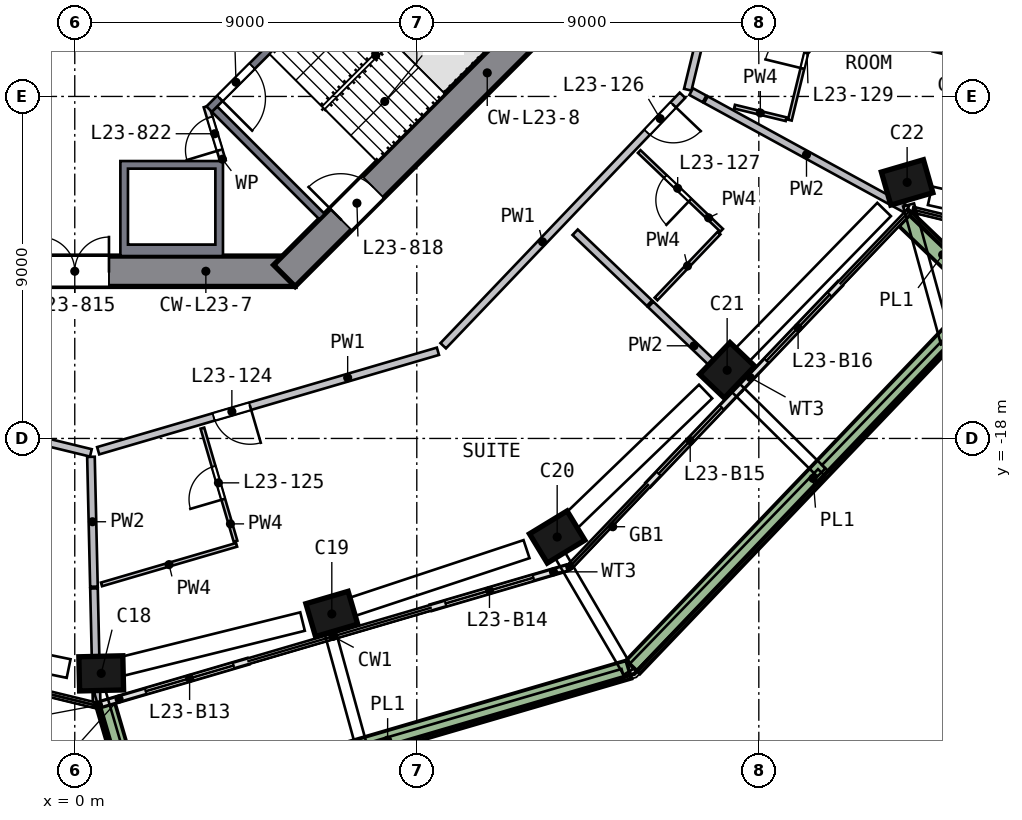
"""IFC4 building model, lengths in metres.
Left out: names, types, materials, properties, quantities, classifications, styles, units other than length and angle.
Written with IfcOpenShell. Run it as: python <this file> out.ifc"""

import sys

from ifc_helpers import new_model, si_unit, direction, frame, frame_2d, origin, origin_2d, place, context, subcontext, project, spatial, polyline, rectangle, outline, extrude, element, fill, save


model = new_model("IFC4")
c1 = context("Model", 3, precision=1e-05, world=origin(), true_north=direction((0.0, 1.0)))
c2 = subcontext(c1, "Body", "Model", "MODEL_VIEW")
j1 = project(units=[si_unit("LENGTHUNIT", "METRE"), si_unit("PLANEANGLEUNIT", "RADIAN")], contexts=[c1])
p1 = place(None, origin())
s1 = spatial("IfcSite", under=j1, at=p1, CompositionType="ELEMENT")
p2 = place(p1, origin())
s2 = spatial("IfcBuilding", under=s1, at=p2, CompositionType="ELEMENT")
p3 = place(p2, frame((0.0, 0.0, 100.0)))
s3 = spatial("IfcBuildingStorey", under=s2, at=p3, CompositionType="ELEMENT", Elevation=100.0)
p4 = place(p3, frame((0.557, -24.186, 0.0), z_axis=(0.114952338, 0.003573254, 0.993364582), x_axis=(-0.993111719, -0.022433132, 0.115003771)))
e1 = element("IfcColumn", 1, at=p4, inside=s3, PredefinedType="COLUMN", context=c2, shape_type="SweptSolid", body=[
    extrude(rectangle(XDim=1.15, YDim=0.9, at=origin_2d()), origin(), (0.0, 0.0, 1.0), 3.211),
])
p5 = place(p3, frame((6.634, -22.657, 0.0), z_axis=(0.10745996, 0.032397695, 0.993681411), x_axis=(0.953784116, 0.278746305, -0.112233498)))
e2 = element("IfcColumn", 2, at=p5, inside=s3, PredefinedType="COLUMN", context=c2, shape_type="SweptSolid", body=[
    extrude(rectangle(XDim=1.15, YDim=0.9, at=origin_2d()), origin(), (0.0, 0.0, 1.0), 3.21),
])
p6 = place(p3, frame((12.576, -20.667, 0.0), z_axis=(0.097845423, 0.060592698, 0.993355323), x_axis=(-0.848941532, -0.515804242, 0.115083708)))
e3 = element("IfcColumn", 3, at=p6, inside=s3, PredefinedType="COLUMN", context=c2, shape_type="SweptSolid", body=[
    extrude(rectangle(XDim=1.15, YDim=0.9, at=origin_2d()), origin(), (0.0, 0.0, 1.0), 3.211),
])
p7 = place(p3, frame((17.074, -16.305, 0.0), z_axis=(0.076886597, 0.0819059, 0.993669902), x_axis=(0.686204712, 0.718682033, -0.112335337)))
e4 = element("IfcColumn", 4, at=p7, inside=s3, PredefinedType="COLUMN", context=c2, shape_type="SweptSolid", body=[
    extrude(rectangle(XDim=1.15, YDim=0.9, at=origin_2d()), origin(), (0.0, 0.0, 1.0), 3.21),
])
p8 = place(p3, frame((21.838, -11.388, 0.0), z_axis=(0.053281548, 0.104282859, 0.99311941), x_axis=(-0.958545217, -0.27343881, 0.080139158)))
e5 = element("IfcColumn", 5, at=p8, inside=s3, PredefinedType="COLUMN", context=c2, shape_type="SweptSolid", body=[
    extrude(rectangle(XDim=1.15, YDim=0.9, at=origin_2d()), origin(), (0.0, 0.0, 1.0), 3.212),
])
p9 = place(p3, frame((23.119, -7.589, 0.0), z_axis=(0.035121525, 0.110229895, 0.993285381), x_axis=(0.971464185, -0.237049872, -0.008043329)))
e6 = element("IfcColumn", 6, at=p9, inside=s3, PredefinedType="COLUMN", context=c2, shape_type="SweptSolid", body=[
    extrude(rectangle(XDim=0.9, YDim=0.9, at=origin_2d()), origin(), (0.0, 0.0, 1.0), 3.211),
])
p10 = place(p3, frame((-5.799, -13.6, 0.0), z_axis=(0.0, 0.0, 1.0), x_axis=(1.0, 0.0, 0.0)))
e7 = element("IfcWall", 7, at=p10, inside=s3, PredefinedType="SHEAR", context=c2, shape_type="SweptSolid", body=[
    extrude(rectangle(XDim=11.598, YDim=0.8, at=frame_2d((5.799, 0.0))), origin(), (0.0, 0.0, 1.0), 3.5),
])
p11 = place(p10, frame((4.899, 0.0, 0.0)))
e8 = element("IfcOpeningElement", 8, at=p11, cuts=e7, PredefinedType="OPENING", context=c2, shape_type="SweptSolid", body=[
    extrude(rectangle(XDim=1.8, YDim=2.1, at=frame_2d((0.9, 1.05))), frame((0.0, 0.41, 0.0), z_axis=(0.0, -1.0, 0.0), x_axis=(1.0, 0.0, 0.0)), (0.0, 0.0, 1.0), 0.82),
])
p12 = place(p3, frame((5.516, -13.717, 0.0), z_axis=(0.0, 0.0, 1.0), x_axis=(0.707106781, 0.707106781, 0.0)))
e9 = element("IfcWall", 9, at=p12, inside=s3, PredefinedType="SHEAR", context=c2, shape_type="SweptSolid", body=[
    extrude(rectangle(XDim=11.598, YDim=0.8, at=frame_2d((5.799, 0.0))), origin(), (0.0, 0.0, 1.0), 3.5),
])
p13 = place(p12, frame((2.099, 0.0, 0.0)))
e10 = element("IfcOpeningElement", 10, at=p13, cuts=e9, PredefinedType="OPENING", context=c2, shape_type="SweptSolid", body=[
    extrude(rectangle(XDim=1.2, YDim=2.1, at=frame_2d((0.6, 1.05))), frame((0.0, 0.41, 0.0), z_axis=(0.0, -1.0, 0.0), x_axis=(1.0, 0.0, 0.0)), (0.0, 0.0, 1.0), 0.82),
])
p14 = place(p3, frame((0.654, -25.007, 0.0), z_axis=(0.0, 0.0, 1.0), x_axis=(0.959709779, 0.280993133, 0.0)))
e11 = element("IfcWall", 11, at=p14, inside=s3, PredefinedType="SOLIDWALL", context=c2, shape_type="SweptSolid", body=[
    extrude(rectangle(XDim=4.068, YDim=0.15, at=frame_2d((2.034, 0.0))), origin(), (0.0, 0.0, 1.0), 2.425),
])
p15 = place(p14, frame((1.268, 0.0, 0.0)))
e12 = element("IfcOpeningElement", 12, at=p15, cuts=e11, PredefinedType="OPENING", context=c2, shape_type="SweptSolid", body=[
    extrude(rectangle(XDim=2.4, YDim=2.4, at=frame_2d((1.2, 1.2))), frame((0.0, 0.085, 0.0), z_axis=(0.0, -1.0, 0.0), x_axis=(1.0, 0.0, 0.0)), (0.0, 0.0, 1.0), 0.17),
])
p16 = place(p3, frame((9.377, -22.453, 0.0), z_axis=(0.0, 0.0, 1.0), x_axis=(0.959710576, 0.280990411, 0.0)))
e13 = element("IfcWall", 13, at=p16, inside=s3, PredefinedType="SOLIDWALL", context=c2, shape_type="SweptSolid", body=[
    extrude(rectangle(XDim=3.71, YDim=0.15, at=frame_2d((1.855, 0.0))), origin(), (0.0, 0.0, 1.0), 2.425),
])
p17 = place(p16, frame((0.4, 0.0, 0.0)))
e14 = element("IfcOpeningElement", 14, at=p17, cuts=e13, PredefinedType="OPENING", context=c2, shape_type="SweptSolid", body=[
    extrude(rectangle(XDim=2.4, YDim=2.4, at=frame_2d((1.2, 1.2))), frame((0.0, 0.085, 0.0), z_axis=(0.0, -1.0, 0.0), x_axis=(1.0, 0.0, 0.0)), (0.0, 0.0, 1.0), 0.17),
])
p18 = place(p3, frame((15.09, -19.215, 0.0), z_axis=(0.0, 0.0, 1.0), x_axis=(0.690619436, 0.723218359, 0.0)))
e15 = element("IfcWall", 15, at=p18, inside=s3, PredefinedType="SOLIDWALL", context=c2, shape_type="SweptSolid", body=[
    extrude(rectangle(XDim=3.475, YDim=0.15, at=frame_2d((1.738, 0.0))), origin(), (0.0, 0.0, 1.0), 2.425),
])
p19 = place(p18, frame((0.4, 0.0, 0.0)))
e16 = element("IfcOpeningElement", 16, at=p19, cuts=e15, PredefinedType="OPENING", context=c2, shape_type="SweptSolid", body=[
    extrude(rectangle(XDim=2.4, YDim=2.4, at=frame_2d((1.2, 1.2))), frame((0.0, 0.085, 0.0), z_axis=(0.0, -1.0, 0.0), x_axis=(1.0, 0.0, 0.0)), (0.0, 0.0, 1.0), 0.17),
])
p20 = place(p3, frame((17.49, -16.702, 0.0), z_axis=(0.0, 0.0, 1.0), x_axis=(0.690655886, 0.72318355, 0.0)))
e17 = element("IfcWall", 17, at=p20, inside=s3, PredefinedType="SOLIDWALL", context=c2, shape_type="SweptSolid", body=[
    extrude(rectangle(XDim=3.835, YDim=0.15, at=frame_2d((1.918, 0.0))), origin(), (0.0, 0.0, 1.0), 2.425),
])
p21 = place(p20, frame((1.035, 0.0, 0.0)))
e18 = element("IfcOpeningElement", 18, at=p21, cuts=e17, PredefinedType="OPENING", context=c2, shape_type="SweptSolid", body=[
    extrude(rectangle(XDim=2.4, YDim=2.4, at=frame_2d((1.2, 1.2))), frame((0.0, 0.085, 0.0), z_axis=(0.0, -1.0, 0.0), x_axis=(1.0, 0.0, 0.0)), (0.0, 0.0, 1.0), 0.17),
])
p22 = place(p3, frame((0.819, -25.038, 0.0), z_axis=(0.0, 0.0, 1.0), x_axis=(0.281005054, -0.959706288, 0.0)))
e19 = element("IfcWall", 19, at=p22, inside=s3, PredefinedType="SOLIDWALL", context=c2, shape_type="SweptSolid", body=[
    extrude(rectangle(XDim=3.199, YDim=0.5, at=frame_2d((1.6, 0.0))), origin(), (0.0, 0.0, 1.0), 0.7),
])
p23 = place(p3, frame((1.887, -27.798, 0.0), z_axis=(0.0, 0.0, 1.0), x_axis=(0.959705837, 0.281006596, 0.0)))
e20 = element("IfcWall", 20, at=p23, inside=s3, PredefinedType="SOLIDWALL", context=c2, shape_type="SweptSolid", body=[
    extrude(rectangle(XDim=13.223, YDim=0.5, at=frame_2d((6.612, 0.0))), origin(), (0.0, 0.0, 1.0), 0.7),
])
p24 = place(p3, frame((14.688, -24.015, 0.0), z_axis=(0.0, 0.0, 1.0), x_axis=(0.690641589, 0.723197204, 0.0)))
e21 = element("IfcWall", 21, at=p24, inside=s3, PredefinedType="SOLIDWALL", context=c2, shape_type="SweptSolid", body=[
    extrude(rectangle(XDim=13.724, YDim=0.5, at=frame_2d((6.862, 0.0))), origin(), (0.0, 0.0, 1.0), 0.7),
])
p25 = place(p3, frame((23.813, -14.098, 0.0), z_axis=(0.0, 0.0, 1.0), x_axis=(-0.723201505, 0.690637085, 0.0)))
e22 = element("IfcWall", 22, at=p25, inside=s3, PredefinedType="SOLIDWALL", context=c2, shape_type="SweptSolid", body=[
    extrude(rectangle(XDim=2.699, YDim=0.5, at=frame_2d((1.35, 0.0))), origin(), (0.0, 0.0, 1.0), 0.7),
])
p26 = place(p3, origin())
e23 = element("IfcWall", 23, at=p26, inside=s3, PredefinedType="SOLIDWALL", context=c2, shape_type="SweptSolid", body=[
    extrude(outline(polyline([(3.9, -10.7), (3.9, -13.2), (1.2, -13.2), (1.2, -10.7), (3.9, -10.7)]), holes=[polyline([(1.4, -12.9), (3.7, -12.9), (3.7, -10.9), (1.4, -10.9), (1.4, -12.9)])]), origin(), (0.0, 0.0, 1.0), 3.19),
])
p27 = place(p3, frame((9.334, -3.535, 0.0), z_axis=(0.0, 0.0, 1.0), x_axis=(-0.707106781, -0.707106781, 0.0)))
e24 = element("IfcWall", 24, at=p27, inside=s3, PredefinedType="SOLIDWALL", context=c2, shape_type="SweptSolid", body=[
    extrude(rectangle(XDim=8.2, YDim=0.2, at=frame_2d((4.1, 0.0))), origin(), (0.0, 0.0, 1.0), 3.19),
])
p28 = place(p27, frame((6.6, 0.0, 0.0)))
e25 = element("IfcOpeningElement", 25, at=p28, cuts=e24, PredefinedType="OPENING", context=c2, shape_type="SweptSolid", body=[
    extrude(rectangle(XDim=1.2, YDim=2.1, at=frame_2d((0.6, 1.05))), frame((0.0, 0.11, 0.0), z_axis=(0.0, -1.0, 0.0), x_axis=(1.0, 0.0, 0.0)), (0.0, 0.0, 1.0), 0.22),
])
p29 = place(p3, frame((3.677, -9.334, 0.0), z_axis=(0.0, 0.0, 1.0), x_axis=(0.707106781, -0.707106781, 0.0)))
e26 = element("IfcWall", 26, at=p29, inside=s3, PredefinedType="SOLIDWALL", context=c2, shape_type="SweptSolid", body=[
    extrude(rectangle(XDim=4.0, YDim=0.2, at=frame_2d((2.0, 0.0))), origin(), (0.0, 0.0, 1.0), 3.19),
])
p30 = place(p3, frame((3.9, -10.7, 0.0), z_axis=(0.0, 0.0, 1.0), x_axis=(-0.289808785, 0.957084567, 0.0)))
e27 = element("IfcWall", 27, at=p30, inside=s3, PredefinedType="PARTITIONING", context=c2, shape_type="SweptSolid", body=[
    extrude(rectangle(XDim=1.501, YDim=0.15, at=frame_2d((0.75, 0.0))), origin(), (0.0, 0.0, 1.0), 3.19),
])
p31 = place(p30, frame((0.301, 0.0, 0.0)))
e28 = element("IfcOpeningElement", 28, at=p31, cuts=e27, PredefinedType="OPENING", context=c2, shape_type="SweptSolid", body=[
    extrude(rectangle(XDim=0.9, YDim=2.1, at=frame_2d((0.45, 1.05))), frame((0.0, 0.085, 0.0), z_axis=(0.0, -1.0, 0.0), x_axis=(1.0, 0.0, 0.0)), (0.0, 0.0, 1.0), 0.17),
])
p32 = place(p3, frame((0.424, -18.38, 0.0), z_axis=(0.0, 0.0, 1.0), x_axis=(-0.971631287, 0.236500827, 0.0)))
e29 = element("IfcWall", 29, at=p32, inside=s3, PredefinedType="SOLIDWALL", context=c2, shape_type="SweptSolid", body=[
    extrude(rectangle(XDim=9.517, YDim=0.2, at=frame_2d((4.758, 0.0))), origin(), (0.0, 0.0, 1.0), 3.19),
])
p33 = place(p32, frame((1.9, 0.0, 0.0)))
e30 = element("IfcOpeningElement", 30, at=p33, cuts=e29, PredefinedType="OPENING", context=c2, shape_type="SweptSolid", body=[
    extrude(rectangle(XDim=1.0, YDim=2.1, at=frame_2d((0.5, 1.05))), frame((0.0, 0.11, 0.0), z_axis=(0.0, -1.0, 0.0), x_axis=(1.0, 0.0, 0.0)), (0.0, 0.0, 1.0), 0.22),
])
p34 = place(p3, frame((9.556, -15.706, 0.0), z_axis=(0.0, 0.0, 1.0), x_axis=(-0.959704488, -0.281011202, 0.0)))
e31 = element("IfcWall", 31, at=p34, inside=s3, PredefinedType="SOLIDWALL", context=c2, shape_type="SweptSolid", body=[
    extrude(rectangle(XDim=9.316, YDim=0.2, at=frame_2d((4.658, 0.0))), origin(), (0.0, 0.0, 1.0), 3.19),
])
p35 = place(p34, frame((5.15, 0.0, 0.0)))
e32 = element("IfcOpeningElement", 32, at=p35, cuts=e31, PredefinedType="OPENING", context=c2, shape_type="SweptSolid", body=[
    extrude(rectangle(XDim=1.0, YDim=2.1, at=frame_2d((0.5, 1.05))), frame((0.0, 0.11, 0.0), z_axis=(0.0, -1.0, 0.0), x_axis=(1.0, 0.0, 0.0)), (0.0, 0.0, 1.0), 0.22),
])
p36 = place(p3, frame((15.991, -8.968, 0.0), z_axis=(0.0, 0.0, 1.0), x_axis=(-0.690622867, -0.723215082, 0.0)))
e33 = element("IfcWall", 33, at=p36, inside=s3, PredefinedType="SOLIDWALL", context=c2, shape_type="SweptSolid", body=[
    extrude(rectangle(XDim=9.116, YDim=0.2, at=frame_2d((4.558, 0.0))), origin(), (0.0, 0.0, 1.0), 3.19),
])
p37 = place(p36, frame((0.35, 0.0, 0.0)))
e34 = element("IfcOpeningElement", 34, at=p37, cuts=e33, PredefinedType="OPENING", context=c2, shape_type="SweptSolid", body=[
    extrude(rectangle(XDim=1.0, YDim=2.1, at=frame_2d((0.5, 1.05))), frame((0.0, 0.11, 0.0), z_axis=(0.0, -1.0, 0.0), x_axis=(1.0, 0.0, 0.0)), (0.0, 0.0, 1.0), 0.22),
])
p38 = place(p3, frame((16.129, -8.823, 0.0), z_axis=(0.0, 0.0, 1.0), x_axis=(0.236501426, 0.971631142, 0.0)))
e35 = element("IfcWall", 35, at=p38, inside=s3, PredefinedType="SOLIDWALL", context=c2, shape_type="SweptSolid", body=[
    extrude(rectangle(XDim=3.658, YDim=0.2, at=frame_2d((1.829, 0.0))), origin(), (0.0, 0.0, 1.0), 3.19),
])
p39 = place(p3, frame((0.426, -18.483, 0.0), z_axis=(0.0, 0.0, 1.0), x_axis=(0.023068584, -0.999733885, 0.0)))
e36 = element("IfcWall", 36, at=p39, inside=s3, PredefinedType="SOLIDWALL", context=c2, shape_type="SweptSolid", body=[
    extrude(rectangle(XDim=3.418, YDim=0.2, at=frame_2d((1.709, 0.0))), origin(), (0.0, 0.0, 1.0), 3.19),
])
p40 = place(p3, frame((0.506, -21.947, 0.0), z_axis=(0.0, 0.0, 1.0), x_axis=(0.023104437, -0.999733057, 0.0)))
e37 = element("IfcWall", 37, at=p40, inside=s3, PredefinedType="SOLIDWALL", context=c2, shape_type="SweptSolid", body=[
    extrude(rectangle(XDim=3.011, YDim=0.2, at=frame_2d((1.506, 0.0))), origin(), (0.0, 0.0, 1.0), 3.19),
])
p41 = place(p3, frame((13.167, -12.573, 0.0), z_axis=(0.0, 0.0, 1.0), x_axis=(0.723166995, -0.690673221, 0.0)))
e38 = element("IfcWall", 38, at=p41, inside=s3, PredefinedType="SOLIDWALL", context=c2, shape_type="SweptSolid", body=[
    extrude(rectangle(XDim=2.705, YDim=0.2, at=frame_2d((1.353, 0.0))), origin(), (0.0, 0.0, 1.0), 3.19),
])
p42 = place(p3, frame((15.156, -14.473, 0.0), z_axis=(0.0, 0.0, 1.0), x_axis=(0.723223643, -0.690613902, 0.0)))
e39 = element("IfcWall", 39, at=p42, inside=s3, PredefinedType="SOLIDWALL", context=c2, shape_type="SweptSolid", body=[
    extrude(rectangle(XDim=3.152, YDim=0.2, at=frame_2d((1.576, 0.0))), origin(), (0.0, 0.0, 1.0), 3.19),
])
p43 = place(p3, frame((16.22, -8.873, 0.0), z_axis=(0.0, 0.0, 1.0), x_axis=(0.877151137, -0.480214413, 0.0)))
e40 = element("IfcWall", 40, at=p43, inside=s3, PredefinedType="SOLIDWALL", context=c2, shape_type="SweptSolid", body=[
    extrude(rectangle(XDim=0.402, YDim=0.2, at=frame_2d((0.201, 0.0))), origin(), (0.0, 0.0, 1.0), 3.19),
])
p44 = place(p3, frame((16.608, -9.085, 0.0), z_axis=(0.0, 0.0, 1.0), x_axis=(0.877318172, -0.479909184, 0.0)))
e41 = element("IfcWall", 41, at=p44, inside=s3, PredefinedType="SOLIDWALL", context=c2, shape_type="SweptSolid", body=[
    extrude(rectangle(XDim=6.034, YDim=0.2, at=frame_2d((3.017, 0.0))), origin(), (0.0, 0.0, 1.0), 3.19),
])
p45 = place(p3, frame((4.258, -20.8, 0.0), z_axis=(0.0, 0.0, 1.0), x_axis=(-0.959692321, -0.281052751, 0.0)))
e42 = element("IfcWall", 42, at=p45, inside=s3, PredefinedType="PARTITIONING", context=c2, shape_type="SweptSolid", body=[
    extrude(rectangle(XDim=3.704, YDim=0.1, at=frame_2d((1.852, 0.0))), origin(), (0.0, 0.0, 1.0), 3.19),
])
p46 = place(p3, frame((4.23, -20.704, 0.0), z_axis=(0.0, 0.0, 1.0), x_axis=(-0.280997832, 0.959708403, 0.0)))
e43 = element("IfcWall", 43, at=p46, inside=s3, PredefinedType="PARTITIONING", context=c2, shape_type="SweptSolid", body=[
    extrude(rectangle(XDim=3.1, YDim=0.1, at=frame_2d((1.55, 0.0))), origin(), (0.0, 0.0, 1.0), 3.19),
])
p47 = place(p46, frame((1.15, 0.0, 0.0)))
e44 = element("IfcOpeningElement", 44, at=p47, cuts=e43, PredefinedType="OPENING", context=c2, shape_type="SweptSolid", body=[
    extrude(rectangle(XDim=0.9, YDim=2.1, at=frame_2d((0.45, 1.05))), frame((0.0, 0.06, 0.0), z_axis=(0.0, -1.0, 0.0), x_axis=(1.0, 0.0, 0.0)), (0.0, 0.0, 1.0), 0.12),
])
p48 = place(p3, frame((17.022, -12.522, 0.0), z_axis=(0.0, 0.0, 1.0), x_axis=(-0.723235441, 0.690601547, 0.0)))
e45 = element("IfcWall", 45, at=p48, inside=s3, PredefinedType="PARTITIONING", context=c2, shape_type="SweptSolid", body=[
    extrude(rectangle(XDim=3.0, YDim=0.1, at=frame_2d((1.5, 0.0))), origin(), (0.0, 0.0, 1.0), 3.19),
])
p49 = place(p48, frame((1.15, 0.0, 0.0)))
e46 = element("IfcOpeningElement", 46, at=p49, cuts=e45, PredefinedType="OPENING", context=c2, shape_type="SweptSolid", body=[
    extrude(rectangle(XDim=0.9, YDim=2.1, at=frame_2d((0.45, 1.05))), frame((0.0, 0.06, 0.0), z_axis=(0.0, -1.0, 0.0), x_axis=(1.0, 0.0, 0.0)), (0.0, 0.0, 1.0), 0.12),
])
p50 = place(p3, frame((16.953, -12.594, 0.0), z_axis=(0.0, 0.0, 1.0), x_axis=(-0.690591866, -0.723244685, 0.0)))
e47 = element("IfcWall", 47, at=p50, inside=s3, PredefinedType="PARTITIONING", context=c2, shape_type="SweptSolid", body=[
    extrude(rectangle(XDim=2.4, YDim=0.1, at=frame_2d((1.2, 0.0))), origin(), (0.0, 0.0, 1.0), 3.19),
])
p51 = place(p3, frame((18.719, -9.599, 0.0), z_axis=(0.0, 0.0, 1.0), x_axis=(-0.971613393, 0.23657433, 0.0)))
e48 = element("IfcWall", 48, at=p51, inside=s3, PredefinedType="PARTITIONING", context=c2, shape_type="SweptSolid", body=[
    extrude(rectangle(XDim=1.398, YDim=0.1, at=frame_2d((0.699, 0.0))), origin(), (0.0, 0.0, 1.0), 3.19),
])
p52 = place(p3, frame((18.816, -9.623, 0.0), z_axis=(0.0, 0.0, 1.0), x_axis=(0.236467516, 0.971639395, 0.0)))
e49 = element("IfcWall", 49, at=p52, inside=s3, PredefinedType="PARTITIONING", context=c2, shape_type="SweptSolid", body=[
    extrude(rectangle(XDim=3.6, YDim=0.1, at=frame_2d((1.8, 0.0))), origin(), (0.0, 0.0, 1.0), 3.19),
])
p53 = place(p52, frame((1.4, 0.0, 0.0)))
e50 = element("IfcOpeningElement", 50, at=p53, cuts=e49, PredefinedType="OPENING", context=c2, shape_type="SweptSolid", body=[
    extrude(rectangle(XDim=1.0, YDim=2.1, at=frame_2d((0.5, 1.05))), frame((0.0, 0.06, 0.0), z_axis=(0.0, -1.0, 0.0), x_axis=(1.0, 0.0, 0.0)), (0.0, 0.0, 1.0), 0.12),
])
p54 = place(p15, origin())
e51 = element("IfcDoor", 51, at=p54, inside=s3, OperationType="SLIDING_TO_LEFT", PredefinedType="DOOR", context=c2, shape_type="SweptSolid", body=[
    extrude(rectangle(XDim=2.4, YDim=2.4, at=frame_2d((1.2, 1.2))), frame((0.0, 0.025, 0.0), z_axis=(0.0, -1.0, 0.0), x_axis=(1.0, 0.0, 0.0)), (0.0, 0.0, 1.0), 0.05),
])
fill(e12, e51)
p55 = place(p17, origin())
e52 = element("IfcDoor", 52, at=p55, inside=s3, OperationType="SLIDING_TO_RIGHT", PredefinedType="DOOR", context=c2, shape_type="SweptSolid", body=[
    extrude(rectangle(XDim=2.4, YDim=2.4, at=frame_2d((1.2, 1.2))), frame((0.0, 0.025, 0.0), z_axis=(0.0, -1.0, 0.0), x_axis=(1.0, 0.0, 0.0)), (0.0, 0.0, 1.0), 0.05),
])
fill(e14, e52)
p56 = place(p19, origin())
e53 = element("IfcDoor", 53, at=p56, inside=s3, OperationType="SLIDING_TO_RIGHT", PredefinedType="DOOR", context=c2, shape_type="SweptSolid", body=[
    extrude(rectangle(XDim=2.4, YDim=2.4, at=frame_2d((1.2, 1.2))), frame((0.0, 0.025, 0.0), z_axis=(0.0, -1.0, 0.0), x_axis=(1.0, 0.0, 0.0)), (0.0, 0.0, 1.0), 0.05),
])
fill(e16, e53)
p57 = place(p21, origin())
e54 = element("IfcDoor", 54, at=p57, inside=s3, OperationType="SLIDING_TO_LEFT", PredefinedType="DOOR", context=c2, shape_type="SweptSolid", body=[
    extrude(rectangle(XDim=2.4, YDim=2.4, at=frame_2d((1.2, 1.2))), frame((0.0, 0.025, 0.0), z_axis=(0.0, -1.0, 0.0), x_axis=(1.0, 0.0, 0.0)), (0.0, 0.0, 1.0), 0.05),
])
fill(e18, e54)
p58 = place(p28, origin())
e55 = element("IfcDoor", 55, at=p58, inside=s3, OperationType="SINGLE_SWING_RIGHT", PredefinedType="DOOR", context=c2, shape_type="SweptSolid", body=[
    extrude(rectangle(XDim=1.2, YDim=2.1, at=frame_2d((0.6, 1.05))), frame((0.0, 0.025, 0.0), z_axis=(0.0, -1.0, 0.0), x_axis=(1.0, 0.0, 0.0)), (0.0, 0.0, 1.0), 0.05),
])
fill(e25, e55)
p59 = place(p11, origin())
e56 = element("IfcDoor", 56, at=p59, inside=s3, OperationType="DOUBLE_DOOR_SINGLE_SWING", PredefinedType="DOOR", context=c2, shape_type="SweptSolid", body=[
    extrude(rectangle(XDim=1.8, YDim=2.1, at=frame_2d((0.9, 1.05))), frame((0.0, 0.025, 0.0), z_axis=(0.0, -1.0, 0.0), x_axis=(1.0, 0.0, 0.0)), (0.0, 0.0, 1.0), 0.05),
])
fill(e8, e56)
p60 = place(p13, origin())
e57 = element("IfcDoor", 57, at=p60, inside=s3, OperationType="SINGLE_SWING_LEFT", PredefinedType="DOOR", context=c2, shape_type="SweptSolid", body=[
    extrude(rectangle(XDim=1.2, YDim=2.1, at=frame_2d((0.6, 1.05))), frame((0.0, 0.025, 0.0), z_axis=(0.0, -1.0, 0.0), x_axis=(1.0, 0.0, 0.0)), (0.0, 0.0, 1.0), 0.05),
])
fill(e10, e57)
p61 = place(p31, origin())
e58 = element("IfcDoor", 58, at=p61, inside=s3, OperationType="SINGLE_SWING_LEFT", PredefinedType="DOOR", context=c2, shape_type="SweptSolid", body=[
    extrude(rectangle(XDim=0.9, YDim=2.1, at=frame_2d((0.45, 1.05))), frame((0.0, 0.025, 0.0), z_axis=(0.0, -1.0, 0.0), x_axis=(1.0, 0.0, 0.0)), (0.0, 0.0, 1.0), 0.05),
])
fill(e28, e58)
p62 = place(p35, origin())
e59 = element("IfcDoor", 59, at=p62, inside=s3, OperationType="SINGLE_SWING_LEFT", PredefinedType="DOOR", context=c2, shape_type="SweptSolid", body=[
    extrude(rectangle(XDim=1.0, YDim=2.1, at=frame_2d((0.5, 1.05))), frame((0.0, 0.025, 0.0), z_axis=(0.0, -1.0, 0.0), x_axis=(1.0, 0.0, 0.0)), (0.0, 0.0, 1.0), 0.05),
])
fill(e32, e59)
p63 = place(p47, origin())
e60 = element("IfcDoor", 60, at=p63, inside=s3, OperationType="SINGLE_SWING_LEFT", PredefinedType="DOOR", context=c2, shape_type="SweptSolid", body=[
    extrude(rectangle(XDim=0.9, YDim=2.1, at=frame_2d((0.45, 1.05))), frame((0.0, 0.025, 0.0), z_axis=(0.0, -1.0, 0.0), x_axis=(1.0, 0.0, 0.0)), (0.0, 0.0, 1.0), 0.05),
])
fill(e44, e60)
p64 = place(p37, origin())
e61 = element("IfcDoor", 61, at=p64, inside=s3, OperationType="SINGLE_SWING_LEFT", PredefinedType="DOOR", context=c2, shape_type="SweptSolid", body=[
    extrude(rectangle(XDim=1.0, YDim=2.1, at=frame_2d((0.5, 1.05))), frame((0.0, 0.025, 0.0), z_axis=(0.0, -1.0, 0.0), x_axis=(1.0, 0.0, 0.0)), (0.0, 0.0, 1.0), 0.05),
])
fill(e34, e61)
p65 = place(p49, origin())
e62 = element("IfcDoor", 62, at=p65, inside=s3, OperationType="SINGLE_SWING_LEFT", PredefinedType="DOOR", context=c2, shape_type="SweptSolid", body=[
    extrude(rectangle(XDim=0.9, YDim=2.1, at=frame_2d((0.45, 1.05))), frame((0.0, 0.025, 0.0), z_axis=(0.0, -1.0, 0.0), x_axis=(1.0, 0.0, 0.0)), (0.0, 0.0, 1.0), 0.05),
])
fill(e46, e62)
p66 = place(p53, origin())
e63 = element("IfcDoor", 63, at=p66, inside=s3, OperationType="SINGLE_SWING_LEFT", PredefinedType="DOOR", context=c2, shape_type="SweptSolid", body=[
    extrude(rectangle(XDim=1.0, YDim=2.1, at=frame_2d((0.5, 1.05))), frame((0.0, 0.025, 0.0), z_axis=(0.0, -1.0, 0.0), x_axis=(1.0, 0.0, 0.0)), (0.0, 0.0, 1.0), 0.05),
])
fill(e50, e63)
save(model, sys.argv[1])
